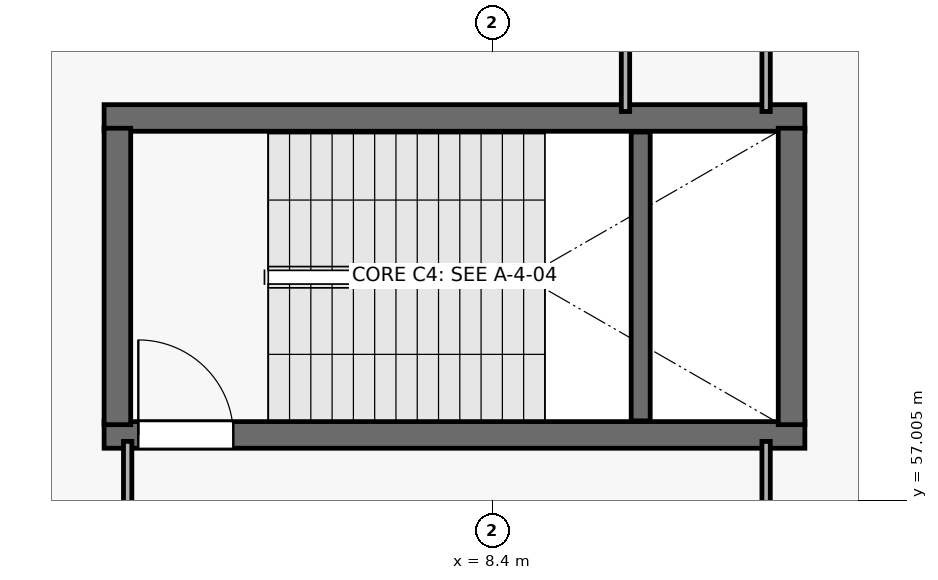
"""IFC4 building model, lengths in metres.
Left out: names, types, materials, properties, quantities, classifications, styles, units other than length and angle.
Written with IfcOpenShell. Run it as: python <this file> out.ifc"""

import sys

from ifc_helpers import new_model, si_unit, direction, frame, frame_2d, origin, place, context, subcontext, project, spatial, rectangle, extrude, element, fill, save


model = new_model("IFC4")
c1 = context("Model", 3, precision=1e-05, world=origin(), true_north=direction((0.0, 1.0)))
c2 = subcontext(c1, "Body", "Model", "MODEL_VIEW")
j1 = project(units=[si_unit("LENGTHUNIT", "METRE"), si_unit("PLANEANGLEUNIT", "RADIAN")], contexts=[c1])
p1 = place(None, origin())
s1 = spatial("IfcSite", under=j1, at=p1, CompositionType="ELEMENT")
p2 = place(p1, origin())
s2 = spatial("IfcBuilding", under=s1, at=p2, CompositionType="ELEMENT")
p3 = place(p2, frame((0.0, 0.0, 15.3)))
s3 = spatial("IfcBuildingStorey", under=s2, at=p3, CompositionType="ELEMENT", Elevation=15.3)
p4 = place(p3, frame((3.29, 57.865, 0.0), z_axis=(0.0, 0.0, 1.0), x_axis=(1.0, 0.0, 0.0)))
e1 = element("IfcWall", 1, at=p4, inside=s3, PredefinedType="SHEAR", context=c2, shape_type="SweptSolid", body=[
    extrude(rectangle(XDim=9.22, YDim=0.35, at=frame_2d((4.61, 0.0))), origin(), (0.0, 0.0, 1.0), 4.82),
])
p5 = place(p4, frame((0.45, 0.0, 0.0)))
e2 = element("IfcOpeningElement", 2, at=p5, cuts=e1, PredefinedType="OPENING", context=c2, shape_type="SweptSolid", body=[
    extrude(rectangle(XDim=1.25, YDim=2.2, at=frame_2d((0.625, 1.1))), frame((0.0, 0.185, 0.0), z_axis=(0.0, -1.0, 0.0), x_axis=(1.0, 0.0, 0.0)), (0.0, 0.0, 1.0), 0.37),
])
p6 = place(p3, frame((12.51, 62.035, 0.0), z_axis=(0.0, 0.0, 1.0), x_axis=(-1.0, 0.0, 0.0)))
e3 = element("IfcWall", 3, at=p6, inside=s3, PredefinedType="SHEAR", context=c2, shape_type="SweptSolid", body=[
    extrude(rectangle(XDim=9.22, YDim=0.35, at=frame_2d((4.61, 0.0))), origin(), (0.0, 0.0, 1.0), 4.82),
])
for number, where, z_axis, x_axis in (
    (4, (3.465, 58.0, 0.0), (0.0, 0.0, 1.0), (0.0, 1.0, 0.0)),
    (5, (12.335, 61.9, 0.0), (0.0, 0.0, 1.0), (0.0, -1.0, 0.0)),
):
    element("IfcWall", number, at=place(p3, frame(where, z_axis=z_axis, x_axis=x_axis)), inside=s3, PredefinedType="SHEAR", context=c2, shape_type="SweptSolid", body=[
        extrude(rectangle(XDim=3.9, YDim=0.35, at=frame_2d((1.95, 0.0))), origin(), (0.0, 0.0, 1.0), 4.82),
    ])
p7 = place(p3, frame((10.35, 58.05, 0.0), z_axis=(0.0, 0.0, 1.0), x_axis=(0.0, 1.0, 0.0)))
e6 = element("IfcWall", 6, at=p7, inside=s3, PredefinedType="SHEAR", context=c2, shape_type="SweptSolid", body=[
    extrude(rectangle(XDim=3.8, YDim=0.25, at=frame_2d((1.9, 0.0))), origin(), (0.0, 0.0, 1.0), 2.37),
])
p8 = place(p3, frame((10.15, 81.8, 0.0), z_axis=(0.0, 0.0, 1.0), x_axis=(0.0, -1.0, 0.0)))
e7 = element("IfcWall", 7, at=p8, inside=s3, PredefinedType="PARTITIONING", context=c2, shape_type="SweptSolid", body=[
    extrude(rectangle(XDim=19.68, YDim=0.11, at=frame_2d((9.84, 0.0))), origin(), (0.0, 0.0, 1.0), 4.82),
])
p9 = place(p3, frame((12.0, 62.12, 0.0), z_axis=(0.0, 0.0, 1.0), x_axis=(0.0, 1.0, 0.0)))
e8 = element("IfcWall", 8, at=p9, inside=s3, PredefinedType="PARTITIONING", context=c2, shape_type="SweptSolid", body=[
    extrude(rectangle(XDim=10.81, YDim=0.11, at=frame_2d((5.405, 0.0))), origin(), (0.0, 0.0, 1.0), 4.82),
])
p10 = place(p3, frame((3.6, 57.78, 0.0), z_axis=(0.0, 0.0, 1.0), x_axis=(0.0, -1.0, 0.0)))
e9 = element("IfcWall", 9, at=p10, inside=s3, PredefinedType="PARTITIONING", context=c2, shape_type="SweptSolid", body=[
    extrude(rectangle(XDim=5.045, YDim=0.11, at=frame_2d((2.522, 0.0))), origin(), (0.0, 0.0, 1.0), 4.82),
])
p11 = place(p3, frame((12.0, 54.28, 0.0), z_axis=(0.0, 0.0, 1.0), x_axis=(0.0, 1.0, 0.0)))
e10 = element("IfcWall", 10, at=p11, inside=s3, PredefinedType="PARTITIONING", context=c2, shape_type="SweptSolid", body=[
    extrude(rectangle(XDim=3.5, YDim=0.11, at=frame_2d((1.75, 0.0))), origin(), (0.0, 0.0, 1.0), 4.82),
])
p12 = place(p5, origin())
e11 = element("IfcDoor", 11, at=p12, inside=s3, OperationType="SINGLE_SWING_LEFT", PredefinedType="DOOR", context=c2, shape_type="SweptSolid", body=[
    extrude(rectangle(XDim=1.25, YDim=2.2, at=frame_2d((0.625, 1.1))), frame((0.0, 0.025, 0.0), z_axis=(0.0, -1.0, 0.0), x_axis=(1.0, 0.0, 0.0)), (0.0, 0.0, 1.0), 0.05),
])
fill(e2, e11)
save(model, sys.argv[1])
